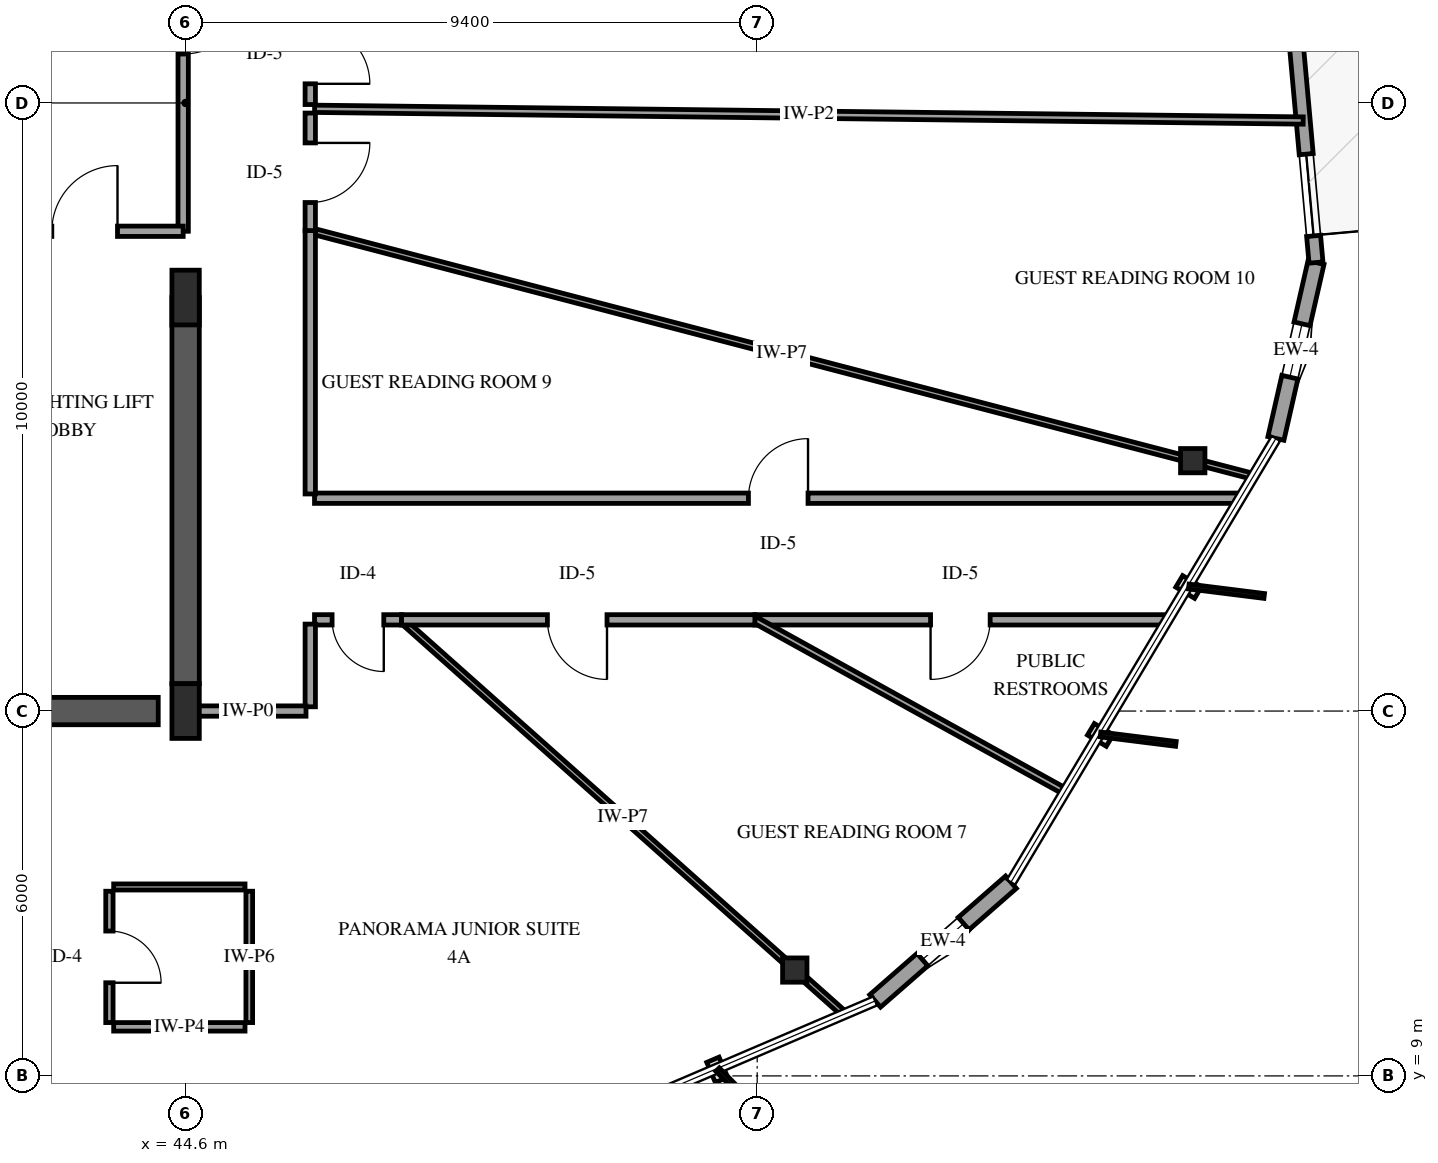
"""IFC4 building model, lengths in metres.
Left out: names, types, materials, properties, quantities, classifications, styles, units other than length and angle.
Written with IfcOpenShell. Run it as: python <this file> out.ifc"""

import sys

from ifc_helpers import new_model, si_unit, direction, frame, frame_2d, origin, origin_2d, place, context, subcontext, project, spatial, rectangle, i_section, extrude, element, fill, save


model = new_model("IFC4")
c1 = context("Model", 3, precision=1e-05, world=origin(), true_north=direction((0.0, 1.0)))
c2 = subcontext(c1, "Body", "Model", "MODEL_VIEW")
j1 = project(units=[si_unit("LENGTHUNIT", "METRE"), si_unit("PLANEANGLEUNIT", "RADIAN")], contexts=[c1])
p1 = place(None, origin())
s1 = spatial("IfcSite", under=j1, at=p1, CompositionType="ELEMENT")
p2 = place(p1, origin())
s2 = spatial("IfcBuilding", under=s1, at=p2, CompositionType="ELEMENT")
p3 = place(p2, frame((0.0, 0.0, 250.0)))
s3 = spatial("IfcBuildingStorey", under=s2, at=p3, CompositionType="ELEMENT", Elevation=250.0)
p4 = place(p3, frame((41.3, 15.0, 0.0), z_axis=(0.0, 0.0, 1.0), x_axis=(1.0, 0.0, 0.0)))
e1 = element("IfcWall", 1, at=p4, inside=s3, PredefinedType="SHEAR", context=c2, shape_type="SweptSolid", body=[
    extrude(rectangle(XDim=2.85, YDim=0.45, at=frame_2d((1.425, 0.0))), origin(), (0.0, 0.0, 1.0), 3.75),
])
p5 = place(p3, frame((44.6, 15.45, 0.0), z_axis=(0.0, 0.0, 1.0), x_axis=(0.0, 1.0, 0.0)))
e2 = element("IfcWall", 2, at=p5, inside=s3, PredefinedType="SHEAR", context=c2, shape_type="SweptSolid", body=[
    extrude(rectangle(XDim=6.35, YDim=0.45, at=frame_2d((3.175, 0.0))), origin(), (0.0, 0.0, 1.0), 3.75),
])
for number, where, z_axis, x_axis in (
    (3, (44.6, 15.0, 0.0), (0.0, 0.0, 1.0), (1.0, 0.0, 0.0)),
    (4, (44.6, 21.8, 0.0), (0.0, 0.0, 1.0), (1.0, 0.0, 0.0)),
):
    element("IfcColumn", number, at=place(p3, frame(where, z_axis=z_axis, x_axis=x_axis)), inside=s3, PredefinedType="PILASTER", context=c2, shape_type="SweptSolid", body=[
        extrude(rectangle(XDim=0.45, YDim=0.9, at=origin_2d()), origin(), (0.0, 0.0, 1.0), 3.75),
    ])
for number, where, z_axis, x_axis in (
    (5, (54.618, 10.74, 0.0), (0.0, 0.0, 1.0), (1.0, 0.0, 0.0)),
    (6, (61.163, 19.117, 0.0), (0.0, 0.0, 1.0), (1.0, 0.0, 0.0)),
):
    element("IfcColumn", number, at=place(p3, frame(where, z_axis=z_axis, x_axis=x_axis)), inside=s3, PredefinedType="COLUMN", context=c2, shape_type="SweptSolid", body=[
        extrude(i_section(OverallWidth=0.401, OverallDepth=0.399, WebThickness=0.025, FlangeThickness=0.04, FilletRadius=0.038, at=origin_2d()), origin(), (0.0, 0.0, 1.0), 3.75),
    ])
p6 = place(p3, frame((55.94, 10.233, 0.0), z_axis=(0.0, 0.0, 1.0), x_axis=(0.75288250817, 0.658154942921, 0.0)))
e7 = element("IfcWall", 7, at=p6, inside=s3, PredefinedType="SOLIDWALL", context=c2, shape_type="SweptSolid", body=[
    extrude(rectangle(XDim=2.967, YDim=0.27, at=frame_2d((1.483, 0.0))), origin(), (0.0, 0.0, 1.0), 2.829),
])
p7 = place(p6, frame((1.033, 0.0, 0.75)))
e8 = element("IfcOpeningElement", 8, at=p7, cuts=e7, PredefinedType="OPENING", context=c2, shape_type="SweptSolid", body=[
    extrude(rectangle(XDim=0.9, YDim=1.5, at=frame_2d((0.45, 0.75))), frame((0.0, 0.145, 0.0), z_axis=(0.0, -1.0, 0.0), x_axis=(1.0, 0.0, 0.0)), (0.0, 0.0, 1.0), 0.29),
])
p8 = place(p3, frame((62.531, 19.483, 0.0), z_axis=(0.0, 0.0, 1.0), x_axis=(0.222190162384, 0.975003349604, 0.0)))
e9 = element("IfcWall", 9, at=p8, inside=s3, PredefinedType="SOLIDWALL", context=c2, shape_type="SweptSolid", body=[
    extrude(rectangle(XDim=2.967, YDim=0.27, at=frame_2d((1.483, 0.0))), origin(), (0.0, 0.0, 1.0), 2.829),
])
p9 = place(p8, frame((1.033, 0.0, 0.75)))
e10 = element("IfcOpeningElement", 10, at=p9, cuts=e9, PredefinedType="OPENING", context=c2, shape_type="SweptSolid", body=[
    extrude(rectangle(XDim=0.9, YDim=1.5, at=frame_2d((0.45, 0.75))), frame((0.0, 0.145, 0.0), z_axis=(0.0, -1.0, 0.0), x_axis=(1.0, 0.0, 0.0)), (0.0, 0.0, 1.0), 0.29),
])
p10 = place(p3, frame((63.19, 22.375, 0.0), z_axis=(0.0, 0.0, 1.0), x_axis=(-0.089932307003, 0.995947880241, 0.0)))
e11 = element("IfcWall", 11, at=p10, inside=s3, PredefinedType="SOLIDWALL", context=c2, shape_type="SweptSolid", body=[
    extrude(rectangle(XDim=8.5, YDim=0.23, at=frame_2d((4.25, 0.0))), origin(), (0.0, 0.0, 1.0), 2.829),
])
p11 = place(p10, frame((3.75, 0.0, 0.0)))
e12 = element("IfcOpeningElement", 12, at=p11, cuts=e11, PredefinedType="OPENING", context=c2, shape_type="SweptSolid", body=[
    extrude(rectangle(XDim=1.0, YDim=2.15, at=frame_2d((0.5, 1.075))), frame((0.0, 0.125, 0.0), z_axis=(0.0, -1.0, 0.0), x_axis=(1.0, 0.0, 0.0)), (0.0, 0.0, 1.0), 0.25),
])
p12 = place(p10, frame((0.44, 0.0, 0.72)))
e13 = element("IfcOpeningElement", 13, at=p12, cuts=e11, PredefinedType="OPENING", context=c2, shape_type="SweptSolid", body=[
    extrude(rectangle(XDim=1.35, YDim=1.65, at=frame_2d((0.675, 0.825))), frame((0.0, 0.125, 0.0), z_axis=(0.0, -1.0, 0.0), x_axis=(1.0, 0.0, 0.0)), (0.0, 0.0, 1.0), 0.25),
])
p13 = place(p10, frame((5.39, 0.0, 0.72)))
e14 = element("IfcOpeningElement", 14, at=p13, cuts=e11, PredefinedType="OPENING", context=c2, shape_type="SweptSolid", body=[
    extrude(rectangle(XDim=1.35, YDim=1.65, at=frame_2d((0.675, 0.825))), frame((0.0, 0.125, 0.0), z_axis=(0.0, -1.0, 0.0), x_axis=(1.0, 0.0, 0.0)), (0.0, 0.0, 1.0), 0.25),
])
p14 = place(p3, frame((62.979, 24.711, 0.0), z_axis=(0.0, 0.0, 1.0), x_axis=(-0.999929462533, 0.011877287476, 0.0)))
e15 = element("IfcWall", 15, at=p14, inside=s3, PredefinedType="PARTITIONING", context=c2, shape_type="SweptSolid", body=[
    extrude(rectangle(XDim=16.259, YDim=0.12, at=frame_2d((8.13, 0.0))), origin(), (0.0, 0.0, 1.0), 3.45),
])
p15 = place(p3, frame((46.65, 22.901, 0.0), z_axis=(0.0, 0.0, 1.0), x_axis=(0.967653178401, -0.252284217364, 0.0)))
e16 = element("IfcWall", 16, at=p15, inside=s3, PredefinedType="PARTITIONING", context=c2, shape_type="SweptSolid", body=[
    extrude(rectangle(XDim=16.025, YDim=0.1, at=frame_2d((8.013, 0.0))), origin(), (0.0, 0.0, 1.0), 3.45),
])
p16 = place(p3, frame((46.72, 18.5, 0.0), z_axis=(0.0, 0.0, 1.0), x_axis=(1.0, 0.0, 0.0)))
e17 = element("IfcWall", 17, at=p16, inside=s3, PredefinedType="PARTITIONING", context=c2, shape_type="SweptSolid", body=[
    extrude(rectangle(XDim=15.223, YDim=0.17, at=frame_2d((7.612, 0.0))), origin(), (0.0, 0.0, 1.0), 2.745),
])
p17 = place(p16, frame((7.136, 0.0, 0.0)))
e18 = element("IfcOpeningElement", 18, at=p17, cuts=e17, PredefinedType="OPENING", context=c2, shape_type="SweptSolid", body=[
    extrude(rectangle(XDim=0.98, YDim=2.15, at=frame_2d((0.49, 1.075))), frame((0.0, 0.095, 0.0), z_axis=(0.0, -1.0, 0.0), x_axis=(1.0, 0.0, 0.0)), (0.0, 0.0, 1.0), 0.19),
])
p18 = place(p3, frame((48.149, 16.5, 0.0), z_axis=(0.0, 0.0, 1.0), x_axis=(0.746947801676, -0.664882682562, 0.0)))
e19 = element("IfcWall", 19, at=p18, inside=s3, PredefinedType="PARTITIONING", context=c2, shape_type="SweptSolid", body=[
    extrude(rectangle(XDim=9.752, YDim=0.1, at=frame_2d((4.876, 0.0))), origin(), (0.0, 0.0, 1.0), 2.828),
])
p19 = place(p3, frame((44.56, 29.8, 0.0), z_axis=(0.0, 0.0, 1.0), x_axis=(0.0, -1.0, 0.0)))
e20 = element("IfcWall", 20, at=p19, inside=s3, PredefinedType="PARTITIONING", context=c2, shape_type="SweptSolid", body=[
    extrude(rectangle(XDim=6.91, YDim=0.17, at=frame_2d((3.455, 0.0))), origin(), (0.0, 0.0, 1.0), 2.49),
])
p20 = place(p19, frame((2.915, 0.0, 0.0)))
e21 = element("IfcOpeningElement", 21, at=p20, cuts=e20, PredefinedType="OPENING", context=c2, shape_type="SweptSolid", body=[
    extrude(rectangle(XDim=1.08, YDim=2.15, at=frame_2d((0.54, 1.075))), frame((0.0, 0.095, 0.0), z_axis=(0.0, -1.0, 0.0), x_axis=(1.0, 0.0, 0.0)), (0.0, 0.0, 1.0), 0.19),
])
p21 = place(p3, frame((60.749, 16.5, 0.0), z_axis=(0.0, 0.0, 1.0), x_axis=(-1.0, 0.0, 0.0)))
e22 = element("IfcWall", 22, at=p21, inside=s3, PredefinedType="PARTITIONING", context=c2, shape_type="SweptSolid", body=[
    extrude(rectangle(XDim=6.787, YDim=0.17, at=frame_2d((3.394, 0.0))), origin(), (0.0, 0.0, 1.0), 3.45),
])
p22 = place(p21, frame((2.918, 0.0, 0.0)))
e23 = element("IfcOpeningElement", 23, at=p22, cuts=e22, PredefinedType="OPENING", context=c2, shape_type="SweptSolid", body=[
    extrude(rectangle(XDim=0.98, YDim=2.15, at=frame_2d((0.49, 1.075))), frame((0.0, 0.095, 0.0), z_axis=(0.0, -1.0, 0.0), x_axis=(1.0, 0.0, 0.0)), (0.0, 0.0, 1.0), 0.19),
])
p23 = place(p3, frame((53.962, 16.5, 0.0), z_axis=(0.0, 0.0, 1.0), x_axis=(0.874991400217, -0.484138461131, 0.0)))
e24 = element("IfcWall", 24, at=p23, inside=s3, PredefinedType="PARTITIONING", context=c2, shape_type="SweptSolid", body=[
    extrude(rectangle(XDim=5.831, YDim=0.11, at=frame_2d((2.916, 0.0))), origin(), (0.0, 0.0, 1.0), 3.45),
])
p24 = place(p3, frame((53.962, 16.5, 0.0), z_axis=(0.0, 0.0, 1.0), x_axis=(-1.0, 0.0, 0.0)))
e25 = element("IfcWall", 25, at=p24, inside=s3, PredefinedType="PARTITIONING", context=c2, shape_type="SweptSolid", body=[
    extrude(rectangle(XDim=5.813, YDim=0.17, at=frame_2d((2.906, 0.0))), origin(), (0.0, 0.0, 1.0), 3.45),
])
p25 = place(p24, frame((2.432, 0.0, 0.0)))
e26 = element("IfcOpeningElement", 26, at=p25, cuts=e25, PredefinedType="OPENING", context=c2, shape_type="SweptSolid", body=[
    extrude(rectangle(XDim=0.98, YDim=2.15, at=frame_2d((0.49, 1.075))), frame((0.0, 0.095, 0.0), z_axis=(0.0, -1.0, 0.0), x_axis=(1.0, 0.0, 0.0)), (0.0, 0.0, 1.0), 0.19),
])
p26 = place(p3, frame((46.65, 22.901, 0.0), z_axis=(0.0, 0.0, 1.0), x_axis=(0.0, -1.0, 0.0)))
e27 = element("IfcWall", 27, at=p26, inside=s3, PredefinedType="PARTITIONING", context=c2, shape_type="SweptSolid", body=[
    extrude(rectangle(XDim=4.331, YDim=0.17, at=frame_2d((2.166, 0.0))), origin(), (0.0, 0.0, 1.0), 3.45),
])
p27 = place(p3, frame((41.32, 22.89, 0.0), z_axis=(0.0, 0.0, 1.0), x_axis=(1.0, 0.0, 0.0)))
e28 = element("IfcWall", 28, at=p27, inside=s3, PredefinedType="PARTITIONING", context=c2, shape_type="SweptSolid", body=[
    extrude(rectangle(XDim=3.24, YDim=0.17, at=frame_2d((1.62, 0.0))), origin(), (0.0, 0.0, 1.0), 3.45),
])
p28 = place(p27, frame((1.08, 0.0, 0.0)))
e29 = element("IfcOpeningElement", 29, at=p28, cuts=e28, PredefinedType="OPENING", context=c2, shape_type="SweptSolid", body=[
    extrude(rectangle(XDim=1.08, YDim=2.15, at=frame_2d((0.54, 1.075))), frame((0.0, 0.095, 0.0), z_axis=(0.0, -1.0, 0.0), x_axis=(1.0, 0.0, 0.0)), (0.0, 0.0, 1.0), 0.19),
])
p29 = place(p3, frame((43.347, 12.037, 0.0), z_axis=(0.0, 0.0, 1.0), x_axis=(0.0, -1.0, 0.0)))
e30 = element("IfcWall", 30, at=p29, inside=s3, PredefinedType="PARTITIONING", context=c2, shape_type="SweptSolid", body=[
    extrude(rectangle(XDim=2.16, YDim=0.12, at=frame_2d((1.08, 0.0))), origin(), (0.0, 0.0, 1.0), 3.45),
])
p30 = place(p29, frame((0.655, 0.0, 0.0)))
e31 = element("IfcOpeningElement", 31, at=p30, cuts=e30, PredefinedType="OPENING", context=c2, shape_type="SweptSolid", body=[
    extrude(rectangle(XDim=0.85, YDim=2.1, at=frame_2d((0.425, 1.05))), frame((0.0, 0.07, 0.0), z_axis=(0.0, -1.0, 0.0), x_axis=(1.0, 0.0, 0.0)), (0.0, 0.0, 1.0), 0.14),
])
p31 = place(p3, frame((45.647, 9.877, 0.0), z_axis=(0.0, 0.0, 1.0), x_axis=(0.0, 1.0, 0.0)))
e32 = element("IfcWall", 32, at=p31, inside=s3, PredefinedType="PARTITIONING", context=c2, shape_type="SweptSolid", body=[
    extrude(rectangle(XDim=2.16, YDim=0.11, at=frame_2d((1.08, 0.0))), origin(), (0.0, 0.0, 1.0), 3.45),
])
p32 = place(p3, frame((45.577, 12.107, 0.0), z_axis=(0.0, 0.0, 1.0), x_axis=(-1.0, 0.0, 0.0)))
e33 = element("IfcWall", 33, at=p32, inside=s3, PredefinedType="PARTITIONING", context=c2, shape_type="SweptSolid", body=[
    extrude(rectangle(XDim=2.16, YDim=0.1, at=frame_2d((1.08, 0.0))), origin(), (0.0, 0.0, 1.0), 3.45),
])
p33 = place(p3, frame((43.417, 9.807, 0.0), z_axis=(0.0, 0.0, 1.0), x_axis=(1.0, 0.0, 0.0)))
e34 = element("IfcWall", 34, at=p33, inside=s3, PredefinedType="PARTITIONING", context=c2, shape_type="SweptSolid", body=[
    extrude(rectangle(XDim=2.16, YDim=0.14, at=frame_2d((1.08, 0.0))), origin(), (0.0, 0.0, 1.0), 3.45),
])
p34 = place(p3, frame((46.65, 24.834, 0.0), z_axis=(0.0, 0.0, 1.0), x_axis=(0.0, -1.0, 0.0)))
e35 = element("IfcWall", 35, at=p34, inside=s3, PredefinedType="PARTITIONING", context=c2, shape_type="SweptSolid", body=[
    extrude(rectangle(XDim=1.933, YDim=0.17, at=frame_2d((0.967, 0.0))), origin(), (0.0, 0.0, 1.0), 3.45),
])
p35 = place(p34, frame((0.491, 0.0, 0.0)))
e36 = element("IfcOpeningElement", 36, at=p35, cuts=e35, PredefinedType="OPENING", context=c2, shape_type="SweptSolid", body=[
    extrude(rectangle(XDim=0.98, YDim=2.15, at=frame_2d((0.49, 1.075))), frame((0.0, 0.095, 0.0), z_axis=(0.0, -1.0, 0.0), x_axis=(1.0, 0.0, 0.0)), (0.0, 0.0, 1.0), 0.19),
])
p36 = place(p3, frame((46.65, 26.665, 0.0), z_axis=(0.0, 0.0, 1.0), x_axis=(0.0, -1.0, 0.0)))
e37 = element("IfcWall", 37, at=p36, inside=s3, PredefinedType="PARTITIONING", context=c2, shape_type="SweptSolid", body=[
    extrude(rectangle(XDim=1.691, YDim=0.17, at=frame_2d((0.845, 0.0))), origin(), (0.0, 0.0, 1.0), 3.45),
])
p37 = place(p36, frame((0.37, 0.0, 0.0)))
e38 = element("IfcOpeningElement", 38, at=p37, cuts=e37, PredefinedType="OPENING", context=c2, shape_type="SweptSolid", body=[
    extrude(rectangle(XDim=0.98, YDim=2.15, at=frame_2d((0.49, 1.075))), frame((0.0, 0.095, 0.0), z_axis=(0.0, -1.0, 0.0), x_axis=(1.0, 0.0, 0.0)), (0.0, 0.0, 1.0), 0.19),
])
p38 = place(p3, frame((48.149, 16.5, 0.0), z_axis=(0.0, 0.0, 1.0), x_axis=(-1.0, 0.0, 0.0)))
e39 = element("IfcWall", 39, at=p38, inside=s3, PredefinedType="PARTITIONING", context=c2, shape_type="SweptSolid", body=[
    extrude(rectangle(XDim=1.429, YDim=0.17, at=frame_2d((0.714, 0.0))), origin(), (0.0, 0.0, 1.0), 3.45),
])
p39 = place(p38, frame((0.29, 0.0, 0.0)))
e40 = element("IfcOpeningElement", 40, at=p39, cuts=e39, PredefinedType="OPENING", context=c2, shape_type="SweptSolid", body=[
    extrude(rectangle(XDim=0.85, YDim=2.1, at=frame_2d((0.425, 1.05))), frame((0.0, 0.095, 0.0), z_axis=(0.0, -1.0, 0.0), x_axis=(1.0, 0.0, 0.0)), (0.0, 0.0, 1.0), 0.19),
])
p40 = place(p3, frame((46.65, 16.43, 0.0), z_axis=(0.0, 0.0, 1.0), x_axis=(0.0, -1.0, 0.0)))
e41 = element("IfcWall", 41, at=p40, inside=s3, PredefinedType="PARTITIONING", context=c2, shape_type="SweptSolid", body=[
    extrude(rectangle(XDim=1.36, YDim=0.17, at=frame_2d((0.68, 0.0))), origin(), (0.0, 0.0, 1.0), 3.45),
])
p41 = place(p3, frame((46.58, 15.0, 0.0), z_axis=(0.0, 0.0, 1.0), x_axis=(-1.0, 0.0, 0.0)))
e42 = element("IfcWall", 42, at=p41, inside=s3, PredefinedType="PARTITIONING", context=c2, shape_type="SweptSolid", body=[
    extrude(rectangle(XDim=1.139, YDim=0.17, at=frame_2d((0.57, 0.0))), origin(), (0.0, 0.0, 1.0), 3.45),
])
p42 = place(p3, frame((45.439, 15.0, 0.0), z_axis=(0.0, 0.0, 1.0), x_axis=(-1.0, 0.0, 0.0)))
e43 = element("IfcWall", 43, at=p42, inside=s3, PredefinedType="PARTITIONING", context=c2, shape_type="SweptSolid", body=[
    extrude(rectangle(XDim=0.769, YDim=0.17, at=frame_2d((0.385, 0.0))), origin(), (0.0, 0.0, 1.0), 3.45),
])
p43 = place(p7, origin())
e44 = element("IfcWindow", 44, at=p43, inside=s3, PartitioningType="SINGLE_PANEL", PredefinedType="WINDOW", context=c2, shape_type="SweptSolid", body=[
    extrude(rectangle(XDim=0.9, YDim=1.5, at=frame_2d((0.45, 0.75))), frame((0.0, 0.03, 0.0), z_axis=(0.0, -1.0, 0.0), x_axis=(1.0, 0.0, 0.0)), (0.0, 0.0, 1.0), 0.06),
])
fill(e8, e44)
p44 = place(p9, origin())
e45 = element("IfcWindow", 45, at=p44, inside=s3, PartitioningType="SINGLE_PANEL", PredefinedType="WINDOW", context=c2, shape_type="SweptSolid", body=[
    extrude(rectangle(XDim=0.9, YDim=1.5, at=frame_2d((0.45, 0.75))), frame((0.0, 0.03, 0.0), z_axis=(0.0, -1.0, 0.0), x_axis=(1.0, 0.0, 0.0)), (0.0, 0.0, 1.0), 0.06),
])
fill(e10, e45)
p45 = place(p12, origin())
e46 = element("IfcWindow", 46, at=p45, inside=s3, PartitioningType="SINGLE_PANEL", PredefinedType="WINDOW", context=c2, shape_type="SweptSolid", body=[
    extrude(rectangle(XDim=1.35, YDim=1.65, at=frame_2d((0.675, 0.825))), frame((0.0, 0.03, 0.0), z_axis=(0.0, -1.0, 0.0), x_axis=(1.0, 0.0, 0.0)), (0.0, 0.0, 1.0), 0.06),
])
fill(e13, e46)
p46 = place(p17, origin())
e47 = element("IfcDoor", 47, at=p46, inside=s3, OperationType="SINGLE_SWING_RIGHT", PredefinedType="DOOR", context=c2, shape_type="SweptSolid", body=[
    extrude(rectangle(XDim=0.98, YDim=2.15, at=frame_2d((0.49, 1.075))), frame((0.0, 0.025, 0.0), z_axis=(0.0, -1.0, 0.0), x_axis=(1.0, 0.0, 0.0)), (0.0, 0.0, 1.0), 0.05),
])
fill(e18, e47)
p47 = place(p20, origin())
e48 = element("IfcDoor", 48, at=p47, inside=s3, OperationType="SINGLE_SWING_LEFT", PredefinedType="DOOR", context=c2, shape_type="SweptSolid", body=[
    extrude(rectangle(XDim=1.08, YDim=2.15, at=frame_2d((0.54, 1.075))), frame((0.0, 0.025, 0.0), z_axis=(0.0, -1.0, 0.0), x_axis=(1.0, 0.0, 0.0)), (0.0, 0.0, 1.0), 0.05),
])
fill(e21, e48)
p48 = place(p22, origin())
e49 = element("IfcDoor", 49, at=p48, inside=s3, OperationType="SINGLE_SWING_RIGHT", PredefinedType="DOOR", context=c2, shape_type="SweptSolid", body=[
    extrude(rectangle(XDim=0.98, YDim=2.15, at=frame_2d((0.49, 1.075))), frame((0.0, 0.025, 0.0), z_axis=(0.0, -1.0, 0.0), x_axis=(1.0, 0.0, 0.0)), (0.0, 0.0, 1.0), 0.05),
])
fill(e23, e49)
p49 = place(p25, origin())
e50 = element("IfcDoor", 50, at=p49, inside=s3, OperationType="SINGLE_SWING_LEFT", PredefinedType="DOOR", context=c2, shape_type="SweptSolid", body=[
    extrude(rectangle(XDim=0.98, YDim=2.15, at=frame_2d((0.49, 1.075))), frame((0.0, 0.025, 0.0), z_axis=(0.0, -1.0, 0.0), x_axis=(1.0, 0.0, 0.0)), (0.0, 0.0, 1.0), 0.05),
])
fill(e26, e50)
p50 = place(p28, origin())
e51 = element("IfcDoor", 51, at=p50, inside=s3, OperationType="SINGLE_SWING_RIGHT", PredefinedType="DOOR", context=c2, shape_type="SweptSolid", body=[
    extrude(rectangle(XDim=1.08, YDim=2.15, at=frame_2d((0.54, 1.075))), frame((0.0, 0.025, 0.0), z_axis=(0.0, -1.0, 0.0), x_axis=(1.0, 0.0, 0.0)), (0.0, 0.0, 1.0), 0.05),
])
fill(e29, e51)
p51 = place(p30, origin())
e52 = element("IfcDoor", 52, at=p51, inside=s3, OperationType="SINGLE_SWING_RIGHT", PredefinedType="DOOR", context=c2, shape_type="SweptSolid", body=[
    extrude(rectangle(XDim=0.85, YDim=2.1, at=frame_2d((0.425, 1.05))), frame((0.0, 0.025, 0.0), z_axis=(0.0, -1.0, 0.0), x_axis=(1.0, 0.0, 0.0)), (0.0, 0.0, 1.0), 0.05),
])
fill(e31, e52)
p52 = place(p35, origin())
e53 = element("IfcDoor", 53, at=p52, inside=s3, OperationType="SINGLE_SWING_LEFT", PredefinedType="DOOR", context=c2, shape_type="SweptSolid", body=[
    extrude(rectangle(XDim=0.98, YDim=2.15, at=frame_2d((0.49, 1.075))), frame((0.0, 0.025, 0.0), z_axis=(0.0, -1.0, 0.0), x_axis=(1.0, 0.0, 0.0)), (0.0, 0.0, 1.0), 0.05),
])
fill(e36, e53)
p53 = place(p37, origin())
e54 = element("IfcDoor", 54, at=p53, inside=s3, OperationType="SINGLE_SWING_RIGHT", PredefinedType="DOOR", context=c2, shape_type="SweptSolid", body=[
    extrude(rectangle(XDim=0.98, YDim=2.15, at=frame_2d((0.49, 1.075))), frame((0.0, 0.025, 0.0), z_axis=(0.0, -1.0, 0.0), x_axis=(1.0, 0.0, 0.0)), (0.0, 0.0, 1.0), 0.05),
])
fill(e38, e54)
p54 = place(p39, origin())
e55 = element("IfcDoor", 55, at=p54, inside=s3, OperationType="SINGLE_SWING_LEFT", PredefinedType="DOOR", context=c2, shape_type="SweptSolid", body=[
    extrude(rectangle(XDim=0.85, YDim=2.1, at=frame_2d((0.425, 1.05))), frame((0.0, 0.025, 0.0), z_axis=(0.0, -1.0, 0.0), x_axis=(1.0, 0.0, 0.0)), (0.0, 0.0, 1.0), 0.05),
])
fill(e40, e55)
save(model, sys.argv[1])
